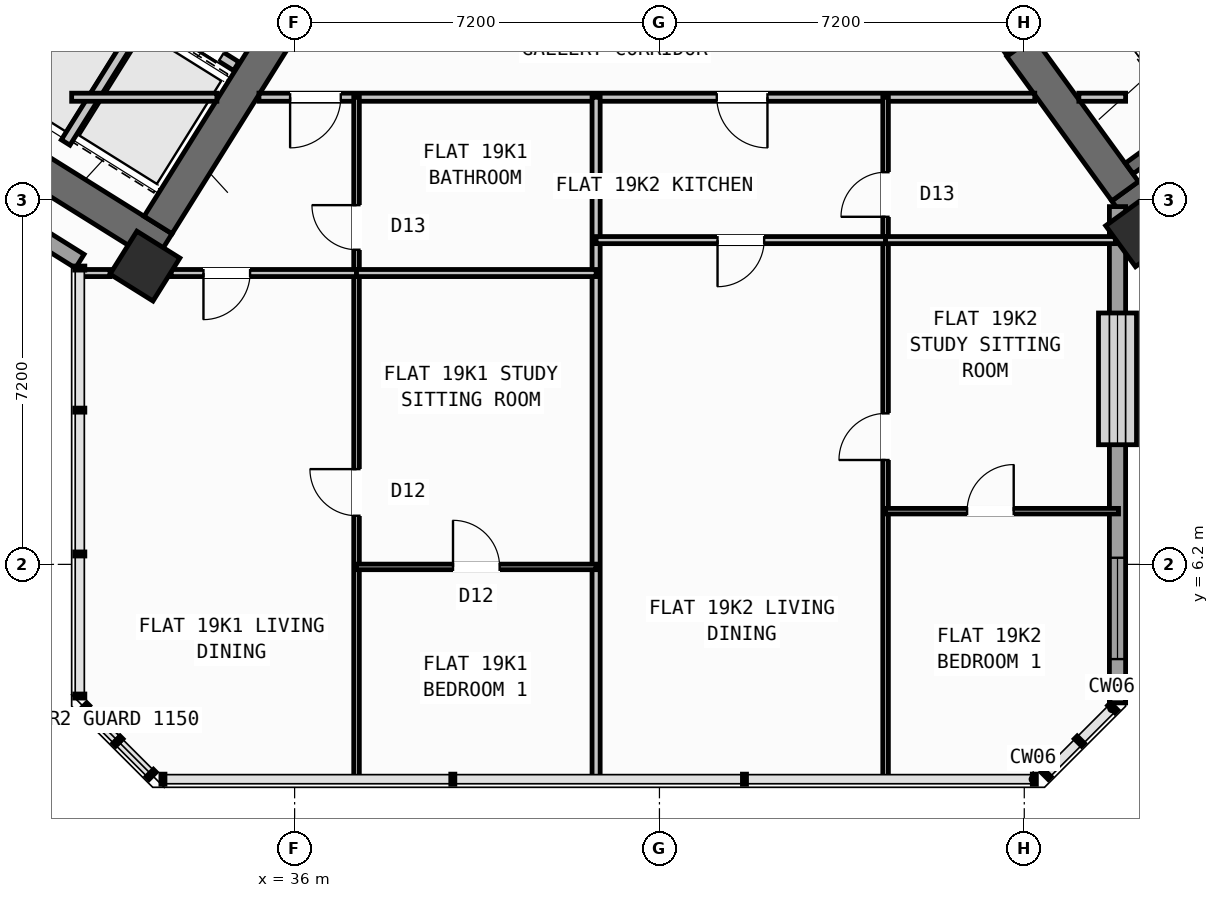
"""IFC4 building model, lengths in metres.
Left out: names, types, materials, properties, quantities, classifications, styles, units other than length and angle.
Written with IfcOpenShell. Run it as: python <this file> out.ifc"""

import sys

from ifc_helpers import new_model, si_unit, direction, frame, frame_2d, origin, origin_2d, place, context, subcontext, project, spatial, rectangle, hollow_rectangle, extrude, source, transform, mapped, element, fill, save


model = new_model("IFC4")
c1 = context("Model", 3, precision=1e-05, world=origin(), true_north=direction((0.0, 1.0)))
c2 = subcontext(c1, "Body", "Model", "MODEL_VIEW")
j1 = project(units=[si_unit("LENGTHUNIT", "METRE"), si_unit("PLANEANGLEUNIT", "RADIAN")], contexts=[c1])
p1 = place(None, origin())
s1 = spatial("IfcSite", under=j1, at=p1, CompositionType="ELEMENT")
p2 = place(p1, origin())
s2 = spatial("IfcBuilding", under=s1, at=p2, CompositionType="ELEMENT")
p3 = place(p2, frame((0.0, 0.0, 76.5)))
s3 = spatial("IfcBuildingStorey", under=s2, at=p3, CompositionType="ELEMENT", Elevation=76.5)
p4 = place(p3, frame((33.409, 12.45, 0.0), z_axis=(0.0, 0.0, 1.0), x_axis=(-0.848051132073, 0.529914405721, 0.0)))
e1 = element("IfcWall", 1, at=p4, inside=s3, PredefinedType="SHEAR", context=c2, shape_type="SweptSolid", body=[
    extrude(rectangle(XDim=13.24, YDim=0.65, at=frame_2d((6.62, 0.0))), origin(), (0.0, 0.0, 1.0), 4.25),
])
p5 = place(p3, frame((36.683, 18.304, 0.0), z_axis=(0.0, 0.0, 1.0), x_axis=(-0.529899109053, -0.848060690178, 0.0)))
e2 = element("IfcWall", 2, at=p5, inside=s3, PredefinedType="SHEAR", context=c2, shape_type="SweptSolid", body=[
    extrude(rectangle(XDim=6.375, YDim=0.65, at=frame_2d((3.188, 0.0))), origin(), (0.0, 0.0, 1.0), 4.25),
])
p6 = place(p3, frame((52.318, 13.11, 0.0), z_axis=(0.0, 0.0, 1.0), x_axis=(0.809019445368, 0.587781878776, 0.0)))
e3 = element("IfcWall", 3, at=p6, inside=s3, PredefinedType="SHEAR", context=c2, shape_type="SweptSolid", body=[
    extrude(rectangle(XDim=12.44, YDim=0.65, at=frame_2d((6.22, 0.0))), origin(), (0.0, 0.0, 1.0), 4.25),
])
p7 = place(p3, frame((52.39, 13.564, 0.0), z_axis=(0.0, 0.0, 1.0), x_axis=(-0.58779688989, 0.809008539037, 0.0)))
e4 = element("IfcWall", 4, at=p7, inside=s3, PredefinedType="SHEAR", context=c2, shape_type="SweptSolid", body=[
    extrude(rectangle(XDim=3.525, YDim=0.65, at=frame_2d((1.763, 0.0))), origin(), (0.0, 0.0, 1.0), 4.25),
])
m1 = source(origin(), c2, "Body", "SweptSolid", [
    extrude(hollow_rectangle(XDim=1.0, YDim=1.0, WallThickness=0.04, at=origin_2d()), origin(), (0.0, 0.0, 1.0), 4.5),
])
for number, where, z_axis, x_axis in (
    (5, (33.046, 12.087, 0.0), (0.0, 0.0, 1.0), (-0.848, 0.53, 0.0)),
    (6, (52.705, 12.773, 0.0), (0.0, 0.0, 1.0), (0.809, 0.588, 0.0)),
):
    element("IfcColumn", number, at=place(p3, frame(where, z_axis=z_axis, x_axis=x_axis)), inside=s3, PredefinedType="COLUMN", context=c2, shape_type="MappedRepresentation", body=[
        mapped(m1, transform((0.0, 0.0, 0.0), scale=1.0)),
    ])
p8 = place(p3, frame((31.76, 12.183, 0.0), z_axis=(0.0, 0.0, 1.0), x_axis=(-0.848047074256, 0.529920899612, 0.0)))
e7 = element("IfcWall", 7, at=p8, inside=s3, PredefinedType="STANDARD", context=c2, shape_type="SweptSolid", body=[
    extrude(rectangle(XDim=30.652, YDim=0.32, at=frame_2d((15.326, 0.0))), origin(), (0.0, 0.0, 1.0), 4.25),
])
p9 = place(p8, frame((14.878, 0.0, 0.0)))
e8 = element("IfcOpeningElement", 8, at=p9, cuts=e7, PredefinedType="OPENING", context=c2, shape_type="SweptSolid", body=[
    extrude(rectangle(XDim=1.2, YDim=2.15, at=frame_2d((0.6, 1.075))), frame((0.0, 0.17, 0.0), z_axis=(0.0, -1.0, 0.0), x_axis=(1.0, 0.0, 0.0)), (0.0, 0.0, 1.0), 0.34),
])
p10 = place(p8, frame((1.74, 0.0, 0.7)))
e9 = element("IfcOpeningElement", 9, at=p10, cuts=e7, PredefinedType="OPENING", context=c2, shape_type="SweptSolid", body=[
    extrude(rectangle(XDim=2.6, YDim=2.0, at=frame_2d((1.3, 1.0))), frame((0.0, 0.17, 0.0), z_axis=(0.0, -1.0, 0.0), x_axis=(1.0, 0.0, 0.0)), (0.0, 0.0, 1.0), 0.34),
])
p11 = place(p8, frame((6.919, 0.0, 0.7)))
e10 = element("IfcOpeningElement", 10, at=p11, cuts=e7, PredefinedType="OPENING", context=c2, shape_type="SweptSolid", body=[
    extrude(rectangle(XDim=2.6, YDim=2.0, at=frame_2d((1.3, 1.0))), frame((0.0, 0.17, 0.0), z_axis=(0.0, -1.0, 0.0), x_axis=(1.0, 0.0, 0.0)), (0.0, 0.0, 1.0), 0.34),
])
p12 = place(p8, frame((19.451, 0.0, 0.85)))
e11 = element("IfcOpeningElement", 11, at=p12, cuts=e7, PredefinedType="OPENING", context=c2, shape_type="SweptSolid", body=[
    extrude(rectangle(XDim=1.6, YDim=1.8, at=frame_2d((0.8, 0.9))), frame((0.0, 0.17, 0.0), z_axis=(0.0, -1.0, 0.0), x_axis=(1.0, 0.0, 0.0)), (0.0, 0.0, 1.0), 0.34),
])
p13 = place(p8, frame((26.358, 0.0, 0.7)))
e12 = element("IfcOpeningElement", 12, at=p13, cuts=e7, PredefinedType="OPENING", context=c2, shape_type="SweptSolid", body=[
    extrude(rectangle(XDim=2.6, YDim=2.0, at=frame_2d((1.3, 1.0))), frame((0.0, 0.17, 0.0), z_axis=(0.0, -1.0, 0.0), x_axis=(1.0, 0.0, 0.0)), (0.0, 0.0, 1.0), 0.34),
])
p14 = place(p3, frame((52.24, 13.261, 0.0), z_axis=(0.0, 0.0, 1.0), x_axis=(0.0, -1.0, 0.0)))
e13 = element("IfcWall", 13, at=p14, inside=s3, PredefinedType="STANDARD", context=c2, shape_type="SweptSolid", body=[
    extrude(rectangle(XDim=9.795, YDim=0.32, at=frame_2d((4.897, 0.0))), origin(), (0.0, 0.0, 1.0), 4.25),
])
p15 = place(p14, frame((2.099, 0.0, 0.7)))
e14 = element("IfcOpeningElement", 14, at=p15, cuts=e13, PredefinedType="OPENING", context=c2, shape_type="SweptSolid", body=[
    extrude(rectangle(XDim=2.6, YDim=2.0, at=frame_2d((1.3, 1.0))), frame((0.0, 0.17, 0.0), z_axis=(0.0, -1.0, 0.0), x_axis=(1.0, 0.0, 0.0)), (0.0, 0.0, 1.0), 0.34),
])
p16 = place(p14, frame((6.93, 0.0, 0.75)))
e15 = element("IfcOpeningElement", 15, at=p16, cuts=e13, PredefinedType="OPENING", context=c2, shape_type="SweptSolid", body=[
    extrude(rectangle(XDim=2.0, YDim=1.95, at=frame_2d((1.0, 0.975))), frame((0.0, 0.17, 0.0), z_axis=(0.0, -1.0, 0.0), x_axis=(1.0, 0.0, 0.0)), (0.0, 0.0, 1.0), 0.34),
])
p17 = place(p3, frame((31.288, 18.256, 0.0), z_axis=(0.0, 0.0, 1.0), x_axis=(-0.529943379326, -0.848033026897, 0.0)))
e16 = element("IfcWall", 16, at=p17, inside=s3, PredefinedType="SHEAR", context=c2, shape_type="SweptSolid", body=[
    extrude(rectangle(XDim=3.16, YDim=0.26, at=frame_2d((1.58, 0.0))), origin(), (0.0, 0.0, 1.0), 4.25),
])
p18 = place(p3, frame((34.848, 16.031, 0.0), z_axis=(0.0, 0.0, 1.0), x_axis=(-0.848044042236, 0.529925751807, 0.0)))
e17 = element("IfcWall", 17, at=p18, inside=s3, PredefinedType="STANDARD", context=c2, shape_type="SweptSolid", body=[
    extrude(rectangle(XDim=4.198, YDim=0.2, at=frame_2d((2.099, 0.0))), origin(), (0.0, 0.0, 1.0), 4.24),
])
p19 = place(p18, frame((0.348, 0.0, 0.0)))
e18 = element("IfcOpeningElement", 18, at=p19, cuts=e17, PredefinedType="OPENING", context=c2, shape_type="SweptSolid", body=[
    extrude(rectangle(XDim=1.3, YDim=2.2, at=frame_2d((0.65, 1.1))), frame((0.0, 0.11, 0.0), z_axis=(0.0, -1.0, 0.0), x_axis=(1.0, 0.0, 0.0)), (0.0, 0.0, 1.0), 0.22),
])
p20 = place(p18, frame((2.423, 0.0, 0.0)))
e19 = element("IfcOpeningElement", 19, at=p20, cuts=e17, PredefinedType="OPENING", context=c2, shape_type="SweptSolid", body=[
    extrude(rectangle(XDim=1.45, YDim=2.25, at=frame_2d((0.725, 1.125))), frame((0.0, 0.11, 0.0), z_axis=(0.0, -1.0, 0.0), x_axis=(1.0, 0.0, 0.0)), (0.0, 0.0, 1.0), 0.22),
])
p21 = place(p3, frame((33.029, 17.003, 0.0), z_axis=(0.0, 0.0, 1.0), x_axis=(-0.529916267533, -0.848049968695, 0.0)))
e20 = element("IfcWall", 20, at=p21, inside=s3, PredefinedType="STANDARD", context=c2, shape_type="SweptSolid", body=[
    extrude(rectangle(XDim=2.92, YDim=0.2, at=frame_2d((1.46, 0.0))), origin(), (0.0, 0.0, 1.0), 4.24),
])
p22 = place(p3, frame((52.472, 14.013, 0.0), z_axis=(0.0, 0.0, 1.0), x_axis=(0.809028366311, 0.587769599847, 0.0)))
e21 = element("IfcWall", 21, at=p22, inside=s3, PredefinedType="SHEAR", context=c2, shape_type="SweptSolid", body=[
    extrude(rectangle(XDim=7.33, YDim=0.26, at=frame_2d((3.665, 0.0))), origin(), (0.0, 0.0, 1.0), 4.25),
])
p23 = place(p3, frame((31.6, 15.42, 0.0), z_axis=(0.0, 0.0, 1.0), x_axis=(1.0, 0.0, 0.0)))
e22 = element("IfcWall", 22, at=p23, inside=s3, PredefinedType="PARTITIONING", context=c2, shape_type="SweptSolid", body=[
    extrude(rectangle(XDim=2.866, YDim=0.16, at=frame_2d((1.433, 0.0))), origin(), (0.0, 0.0, 1.0), 4.24),
])
p24 = place(p3, frame((35.296, 15.42, 0.0), z_axis=(0.0, 0.0, 1.0), x_axis=(1.0, 0.0, 0.0)))
e23 = element("IfcWall", 23, at=p24, inside=s3, PredefinedType="PARTITIONING", context=c2, shape_type="SweptSolid", body=[
    extrude(rectangle(XDim=15.311, YDim=0.16, at=frame_2d((7.655, 0.0))), origin(), (0.0, 0.0, 1.0), 4.24),
])
p25 = place(p24, frame((0.615, 0.0, 0.0)))
e24 = element("IfcOpeningElement", 24, at=p25, cuts=e23, PredefinedType="OPENING", context=c2, shape_type="SweptSolid", body=[
    extrude(rectangle(XDim=1.0, YDim=2.1, at=frame_2d((0.5, 1.05))), frame((0.0, 0.09, 0.0), z_axis=(0.0, -1.0, 0.0), x_axis=(1.0, 0.0, 0.0)), (0.0, 0.0, 1.0), 0.18),
])
p26 = place(p24, frame((9.035, 0.0, 0.0)))
e25 = element("IfcOpeningElement", 25, at=p26, cuts=e23, PredefinedType="OPENING", context=c2, shape_type="SweptSolid", body=[
    extrude(rectangle(XDim=1.0, YDim=2.1, at=frame_2d((0.5, 1.05))), frame((0.0, 0.09, 0.0), z_axis=(0.0, -1.0, 0.0), x_axis=(1.0, 0.0, 0.0)), (0.0, 0.0, 1.0), 0.18),
])
p27 = place(p3, frame((51.477, 15.42, 0.0), z_axis=(0.0, 0.0, 1.0), x_axis=(1.0, 0.0, 0.0)))
e26 = element("IfcWall", 26, at=p27, inside=s3, PredefinedType="PARTITIONING", context=c2, shape_type="SweptSolid", body=[
    extrude(rectangle(XDim=0.923, YDim=0.16, at=frame_2d((0.461, 0.0))), origin(), (0.0, 0.0, 1.0), 4.24),
])
p28 = place(p3, frame((50.119, 16.333, 0.0), z_axis=(0.0, 0.0, 1.0), x_axis=(-0.587749856981, 0.809042709391, 0.0)))
e27 = element("IfcWall", 27, at=p28, inside=s3, PredefinedType="STANDARD", context=c2, shape_type="SweptSolid", body=[
    extrude(rectangle(XDim=2.96, YDim=0.2, at=frame_2d((1.48, 0.0))), origin(), (0.0, 0.0, 1.0), 4.24),
])
p29 = place(p28, frame((0.53, 0.0, 0.0)))
e28 = element("IfcOpeningElement", 28, at=p29, cuts=e27, PredefinedType="OPENING", context=c2, shape_type="SweptSolid", body=[
    extrude(rectangle(XDim=1.5, YDim=2.15, at=frame_2d((0.75, 1.075))), frame((0.0, 0.11, 0.0), z_axis=(0.0, -1.0, 0.0), x_axis=(1.0, 0.0, 0.0)), (0.0, 0.0, 1.0), 0.22),
])
p30 = place(p3, frame((41.95, 1.96, 0.0), z_axis=(0.0, 0.0, 1.0), x_axis=(0.0, 1.0, 0.0)))
e29 = element("IfcWall", 29, at=p30, inside=s3, PredefinedType="PARTITIONING", context=c2, shape_type="SweptSolid", body=[
    extrude(rectangle(XDim=13.46, YDim=0.16, at=frame_2d((6.73, 0.0))), origin(), (0.0, 0.0, 1.0), 4.24),
])
p31 = place(p3, frame((37.222, 1.96, 0.0), z_axis=(0.0, 0.0, 1.0), x_axis=(0.0, 1.0, 0.0)))
e30 = element("IfcWall", 30, at=p31, inside=s3, PredefinedType="PARTITIONING", context=c2, shape_type="SweptSolid", body=[
    extrude(rectangle(XDim=13.46, YDim=0.11, at=frame_2d((6.73, 0.0))), origin(), (0.0, 0.0, 1.0), 4.24),
])
p32 = place(p31, frame((5.2, 0.0, 0.0)))
e31 = element("IfcOpeningElement", 31, at=p32, cuts=e30, PredefinedType="OPENING", context=c2, shape_type="SweptSolid", body=[
    extrude(rectangle(XDim=0.92, YDim=2.08, at=frame_2d((0.46, 1.04))), frame((0.0, 0.065, 0.0), z_axis=(0.0, -1.0, 0.0), x_axis=(1.0, 0.0, 0.0)), (0.0, 0.0, 1.0), 0.13),
])
p33 = place(p31, frame((10.45, 0.0, 0.0)))
e32 = element("IfcOpeningElement", 32, at=p33, cuts=e30, PredefinedType="OPENING", context=c2, shape_type="SweptSolid", body=[
    extrude(rectangle(XDim=0.88, YDim=2.08, at=frame_2d((0.44, 1.04))), frame((0.0, 0.065, 0.0), z_axis=(0.0, -1.0, 0.0), x_axis=(1.0, 0.0, 0.0)), (0.0, 0.0, 1.0), 0.13),
])
p34 = place(p3, frame((31.74, 11.95, 0.0), z_axis=(0.0, 0.0, 1.0), x_axis=(1.0, 0.0, 0.0)))
e33 = element("IfcWall", 33, at=p34, inside=s3, PredefinedType="PLUMBINGWALL", context=c2, shape_type="SweptSolid", body=[
    extrude(rectangle(XDim=0.617, YDim=0.14, at=frame_2d((0.309, 0.0))), origin(), (0.0, 0.0, 1.0), 4.24),
])
p35 = place(p3, frame((33.564, 11.95, 0.0), z_axis=(0.0, 0.0, 1.0), x_axis=(1.0, 0.0, 0.0)))
e34 = element("IfcWall", 34, at=p35, inside=s3, PredefinedType="PLUMBINGWALL", context=c2, shape_type="SweptSolid", body=[
    extrude(rectangle(XDim=3.657, YDim=0.14, at=frame_2d((1.829, 0.0))), origin(), (0.0, 0.0, 1.0), 3.425),
])
p36 = place(p35, frame((0.637, 0.0, 0.0)))
e35 = element("IfcOpeningElement", 35, at=p36, cuts=e34, PredefinedType="OPENING", context=c2, shape_type="SweptSolid", body=[
    extrude(rectangle(XDim=0.92, YDim=2.08, at=frame_2d((0.46, 1.04))), frame((0.0, 0.08, 0.0), z_axis=(0.0, -1.0, 0.0), x_axis=(1.0, 0.0, 0.0)), (0.0, 0.0, 1.0), 0.16),
])
p37 = place(p3, frame((37.222, 11.95, 0.0), z_axis=(0.0, 0.0, 1.0), x_axis=(1.0, 0.0, 0.0)))
e36 = element("IfcWall", 36, at=p37, inside=s3, PredefinedType="PLUMBINGWALL", context=c2, shape_type="SweptSolid", body=[
    extrude(rectangle(XDim=4.728, YDim=0.14, at=frame_2d((2.364, 0.0))), origin(), (0.0, 0.0, 1.0), 3.425),
])
p38 = place(p3, frame((37.222, 6.15, 0.0), z_axis=(0.0, 0.0, 1.0), x_axis=(1.0, 0.0, 0.0)))
e37 = element("IfcWall", 37, at=p38, inside=s3, PredefinedType="PARTITIONING", context=c2, shape_type="SweptSolid", body=[
    extrude(rectangle(XDim=4.728, YDim=0.11, at=frame_2d((2.364, 0.0))), origin(), (0.0, 0.0, 1.0), 4.24),
])
p39 = place(p38, frame((1.904, 0.0, 0.0)))
e38 = element("IfcOpeningElement", 38, at=p39, cuts=e37, PredefinedType="OPENING", context=c2, shape_type="SweptSolid", body=[
    extrude(rectangle(XDim=0.92, YDim=2.08, at=frame_2d((0.46, 1.04))), frame((0.0, 0.065, 0.0), z_axis=(0.0, -1.0, 0.0), x_axis=(1.0, 0.0, 0.0)), (0.0, 0.0, 1.0), 0.13),
])
p40 = place(p3, frame((47.663, 1.96, 0.0), z_axis=(0.0, 0.0, 1.0), x_axis=(0.0, 1.0, 0.0)))
e39 = element("IfcWall", 39, at=p40, inside=s3, PredefinedType="PARTITIONING", context=c2, shape_type="SweptSolid", body=[
    extrude(rectangle(XDim=13.46, YDim=0.11, at=frame_2d((6.73, 0.0))), origin(), (0.0, 0.0, 1.0), 4.24),
])
p41 = place(p40, frame((6.3, 0.0, 0.0)))
e40 = element("IfcOpeningElement", 40, at=p41, cuts=e39, PredefinedType="OPENING", context=c2, shape_type="SweptSolid", body=[
    extrude(rectangle(XDim=0.92, YDim=2.08, at=frame_2d((0.46, 1.04))), frame((0.0, 0.065, 0.0), z_axis=(0.0, -1.0, 0.0), x_axis=(1.0, 0.0, 0.0)), (0.0, 0.0, 1.0), 0.13),
])
p42 = place(p40, frame((11.1, 0.0, 0.0)))
e41 = element("IfcOpeningElement", 41, at=p42, cuts=e39, PredefinedType="OPENING", context=c2, shape_type="SweptSolid", body=[
    extrude(rectangle(XDim=0.88, YDim=2.08, at=frame_2d((0.44, 1.04))), frame((0.0, 0.065, 0.0), z_axis=(0.0, -1.0, 0.0), x_axis=(1.0, 0.0, 0.0)), (0.0, 0.0, 1.0), 0.13),
])
p43 = place(p3, frame((41.95, 12.6, 0.0), z_axis=(0.0, 0.0, 1.0), x_axis=(1.0, 0.0, 0.0)))
e42 = element("IfcWall", 42, at=p43, inside=s3, PredefinedType="PLUMBINGWALL", context=c2, shape_type="SweptSolid", body=[
    extrude(rectangle(XDim=5.713, YDim=0.14, at=frame_2d((2.856, 0.0))), origin(), (0.0, 0.0, 1.0), 3.425),
])
p44 = place(p43, frame((2.396, 0.0, 0.0)))
e43 = element("IfcOpeningElement", 43, at=p44, cuts=e42, PredefinedType="OPENING", context=c2, shape_type="SweptSolid", body=[
    extrude(rectangle(XDim=0.92, YDim=2.08, at=frame_2d((0.46, 1.04))), frame((0.0, 0.08, 0.0), z_axis=(0.0, -1.0, 0.0), x_axis=(1.0, 0.0, 0.0)), (0.0, 0.0, 1.0), 0.16),
])
p45 = place(p3, frame((47.663, 12.6, 0.0), z_axis=(0.0, 0.0, 1.0), x_axis=(1.0, 0.0, 0.0)))
e44 = element("IfcWall", 44, at=p45, inside=s3, PredefinedType="PLUMBINGWALL", context=c2, shape_type="SweptSolid", body=[
    extrude(rectangle(XDim=4.535, YDim=0.14, at=frame_2d((2.268, 0.0))), origin(), (0.0, 0.0, 1.0), 3.425),
])
p46 = place(p3, frame((47.663, 7.25, 0.0), z_axis=(0.0, 0.0, 1.0), x_axis=(1.0, 0.0, 0.0)))
e45 = element("IfcWall", 45, at=p46, inside=s3, PredefinedType="PARTITIONING", context=c2, shape_type="SweptSolid", body=[
    extrude(rectangle(XDim=4.597, YDim=0.11, at=frame_2d((2.298, 0.0))), origin(), (0.0, 0.0, 1.0), 4.24),
])
p47 = place(p46, frame((1.608, 0.0, 0.0)))
e46 = element("IfcOpeningElement", 46, at=p47, cuts=e45, PredefinedType="OPENING", context=c2, shape_type="SweptSolid", body=[
    extrude(rectangle(XDim=0.92, YDim=2.08, at=frame_2d((0.46, 1.04))), frame((0.0, 0.065, 0.0), z_axis=(0.0, -1.0, 0.0), x_axis=(1.0, 0.0, 0.0)), (0.0, 0.0, 1.0), 0.13),
])
m2 = source(origin(), c2, "Body", "SweptSolid", [
    extrude(rectangle(XDim=2.6, YDim=2.0, at=frame_2d((1.3, 1.0))), frame((0.0, 0.03, 0.0), z_axis=(0.0, -1.0, 0.0), x_axis=(1.0, 0.0, 0.0)), (0.0, 0.0, 1.0), 0.06),
])
p48 = place(p15, origin())
e47 = element("IfcWindow", 47, at=p48, inside=s3, PartitioningType="SINGLE_PANEL", PredefinedType="WINDOW", context=c2, shape_type="MappedRepresentation", body=[
    mapped(m2, transform((0.0, 0.0, 0.0), scale=1.0)),
])
fill(e14, e47)
m3 = source(origin(), c2, "Body", "SweptSolid", [
    extrude(rectangle(XDim=2.0, YDim=1.95, at=frame_2d((1.0, 0.975))), frame((0.0, 0.03, 0.0), z_axis=(0.0, -1.0, 0.0), x_axis=(1.0, 0.0, 0.0)), (0.0, 0.0, 1.0), 0.06),
])
p49 = place(p16, origin())
e48 = element("IfcWindow", 48, at=p49, inside=s3, PartitioningType="SINGLE_PANEL", PredefinedType="WINDOW", context=c2, shape_type="MappedRepresentation", body=[
    mapped(m3, transform((0.0, 0.0, 0.0), scale=1.0)),
])
fill(e15, e48)
m4 = source(origin(), c2, "Body", "SweptSolid", [
    extrude(rectangle(XDim=1.3, YDim=2.2, at=frame_2d((0.65, 1.1))), frame((0.0, 0.025, 0.0), z_axis=(0.0, -1.0, 0.0), x_axis=(1.0, 0.0, 0.0)), (0.0, 0.0, 1.0), 0.05),
])
p50 = place(p19, origin())
e49 = element("IfcDoor", 49, at=p50, inside=s3, OperationType="DOUBLE_DOOR_SLIDING", PredefinedType="DOOR", context=c2, shape_type="MappedRepresentation", body=[
    mapped(m4, transform((0.0, 0.0, 0.0), scale=1.0)),
])
fill(e18, e49)
m5 = source(origin(), c2, "Body", "SweptSolid", [
    extrude(rectangle(XDim=0.92, YDim=2.08, at=frame_2d((0.46, 1.04))), frame((0.0, 0.025, 0.0), z_axis=(0.0, -1.0, 0.0), x_axis=(1.0, 0.0, 0.0)), (0.0, 0.0, 1.0), 0.05),
])
p51 = place(p32, origin())
e50 = element("IfcDoor", 50, at=p51, inside=s3, OperationType="SINGLE_SWING_RIGHT", PredefinedType="DOOR", context=c2, shape_type="MappedRepresentation", body=[
    mapped(m5, transform((0.0, 0.0, 0.0), scale=1.0)),
])
fill(e31, e50)
p52 = place(p39, origin())
e51 = element("IfcDoor", 51, at=p52, inside=s3, OperationType="SINGLE_SWING_LEFT", PredefinedType="DOOR", context=c2, shape_type="MappedRepresentation", body=[
    mapped(m5, transform((0.0, 0.0, 0.0), scale=1.0)),
])
fill(e38, e51)
m6 = source(origin(), c2, "Body", "SweptSolid", [
    extrude(rectangle(XDim=1.0, YDim=2.1, at=frame_2d((0.5, 1.05))), frame((0.0, 0.025, 0.0), z_axis=(0.0, -1.0, 0.0), x_axis=(1.0, 0.0, 0.0)), (0.0, 0.0, 1.0), 0.05),
])
p53 = place(p25, frame((1.0, 0.0, 0.0), z_axis=(0.0, 0.0, 1.0), x_axis=(-1.0, 0.0, 0.0)))
e52 = element("IfcDoor", 52, at=p53, inside=s3, OperationType="SINGLE_SWING_RIGHT", PredefinedType="DOOR", context=c2, shape_type="MappedRepresentation", body=[
    mapped(m6, transform((0.0, 0.0, 0.0), scale=1.0)),
])
fill(e24, e52)
p54 = place(p36, frame((0.92, 0.0, 0.0), z_axis=(0.0, 0.0, 1.0), x_axis=(-1.0, 0.0, 0.0)))
e53 = element("IfcDoor", 53, at=p54, inside=s3, OperationType="SINGLE_SWING_RIGHT", PredefinedType="DOOR", context=c2, shape_type="MappedRepresentation", body=[
    mapped(m5, transform((0.0, 0.0, 0.0), scale=1.0)),
])
fill(e35, e53)
m7 = source(origin(), c2, "Body", "SweptSolid", [
    extrude(rectangle(XDim=0.88, YDim=2.08, at=frame_2d((0.44, 1.04))), frame((0.0, 0.025, 0.0), z_axis=(0.0, -1.0, 0.0), x_axis=(1.0, 0.0, 0.0)), (0.0, 0.0, 1.0), 0.05),
])
p55 = place(p33, origin())
e54 = element("IfcDoor", 54, at=p55, inside=s3, OperationType="SINGLE_SWING_RIGHT", PredefinedType="DOOR", context=c2, shape_type="MappedRepresentation", body=[
    mapped(m7, transform((0.0, 0.0, 0.0), scale=1.0)),
])
fill(e32, e54)
p56 = place(p41, origin())
e55 = element("IfcDoor", 55, at=p56, inside=s3, OperationType="SINGLE_SWING_LEFT", PredefinedType="DOOR", context=c2, shape_type="MappedRepresentation", body=[
    mapped(m5, transform((0.0, 0.0, 0.0), scale=1.0)),
])
fill(e40, e55)
p57 = place(p47, origin())
e56 = element("IfcDoor", 56, at=p57, inside=s3, OperationType="SINGLE_SWING_RIGHT", PredefinedType="DOOR", context=c2, shape_type="MappedRepresentation", body=[
    mapped(m5, transform((0.0, 0.0, 0.0), scale=1.0)),
])
fill(e46, e56)
p58 = place(p26, frame((1.0, 0.0, 0.0), z_axis=(0.0, 0.0, 1.0), x_axis=(-1.0, 0.0, 0.0)))
e57 = element("IfcDoor", 57, at=p58, inside=s3, OperationType="SINGLE_SWING_LEFT", PredefinedType="DOOR", context=c2, shape_type="MappedRepresentation", body=[
    mapped(m6, transform((0.0, 0.0, 0.0), scale=1.0)),
])
fill(e25, e57)
p59 = place(p44, frame((0.92, 0.0, 0.0), z_axis=(0.0, 0.0, 1.0), x_axis=(-1.0, 0.0, 0.0)))
e58 = element("IfcDoor", 58, at=p59, inside=s3, OperationType="SINGLE_SWING_RIGHT", PredefinedType="DOOR", context=c2, shape_type="MappedRepresentation", body=[
    mapped(m5, transform((0.0, 0.0, 0.0), scale=1.0)),
])
fill(e43, e58)
p60 = place(p42, origin())
e59 = element("IfcDoor", 59, at=p60, inside=s3, OperationType="SINGLE_SWING_LEFT", PredefinedType="DOOR", context=c2, shape_type="MappedRepresentation", body=[
    mapped(m7, transform((0.0, 0.0, 0.0), scale=1.0)),
])
fill(e41, e59)
save(model, sys.argv[1])
